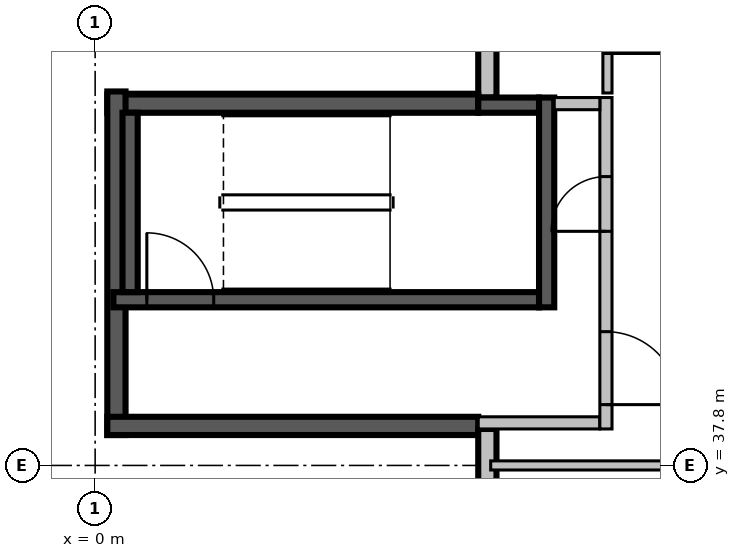
"""IFC4 building model, lengths in metres.
Left out: names, types, materials, properties, quantities, classifications, styles, units other than length and angle.
Written with IfcOpenShell. Run it as: python <this file> out.ifc"""

import sys

from ifc_helpers import new_model, si_unit, direction, frame, frame_2d, origin, place, context, subcontext, project, spatial, rectangle, extrude, source, transform, mapped, element, fill, save


model = new_model("IFC4")
c1 = context("Model", 3, precision=1e-05, world=origin(), true_north=direction((0.0, 1.0)))
c2 = subcontext(c1, "Body", "Model", "MODEL_VIEW")
j1 = project(units=[si_unit("LENGTHUNIT", "METRE"), si_unit("PLANEANGLEUNIT", "RADIAN")], contexts=[c1])
p1 = place(None, origin())
s1 = spatial("IfcSite", under=j1, at=p1, CompositionType="ELEMENT")
p2 = place(p1, origin())
s2 = spatial("IfcBuilding", under=s1, at=p2, CompositionType="ELEMENT")
p3 = place(p2, frame((0.0, 0.0, 141.3)))
s3 = spatial("IfcBuildingStorey", under=s2, at=p3, CompositionType="ELEMENT", Elevation=141.3)
m1 = source(origin(), c2, "Body", "SweptSolid", [
    extrude(rectangle(XDim=9.91, YDim=0.3, at=frame_2d((4.955, 0.0))), origin(), (0.0, 0.0, 1.0), 3.8),
])
p4 = place(p3, frame((6.45, 53.76, 0.0), z_axis=(0.0, 0.0, 1.0), x_axis=(0.0, -1.0, 0.0)))
e1 = element("IfcWall", 1, at=p4, inside=s3, PredefinedType="STANDARD", context=c2, shape_type="MappedRepresentation", body=[
    mapped(m1, transform((0.0, 0.0, 0.0), scale=1.0)),
])
m2 = source(origin(), c2, "Body", "SweptSolid", [
    extrude(rectangle(XDim=2.4, YDim=2.7, at=frame_2d((1.2, 1.35))), frame((0.0, 0.16, 0.0), z_axis=(0.0, -1.0, 0.0), x_axis=(1.0, 0.0, 0.0)), (0.0, 0.0, 1.0), 0.32),
])
p5 = place(p4, frame((4.272, 0.0, 0.6)))
e2 = element("IfcOpeningElement", 2, at=p5, cuts=e1, PredefinedType="OPENING", context=c2, shape_type="MappedRepresentation", body=[
    mapped(m2, transform((0.0, 0.0, 0.0), scale=1.0)),
])
p6 = place(p4, frame((0.936, 0.0, 0.6)))
e3 = element("IfcOpeningElement", 3, at=p6, cuts=e1, PredefinedType="OPENING", context=c2, shape_type="MappedRepresentation", body=[
    mapped(m2, transform((0.0, 0.0, 0.0), scale=1.0)),
])
m3 = source(origin(), c2, "Body", "SweptSolid", [
    extrude(rectangle(XDim=6.1, YDim=0.3, at=frame_2d((3.05, 0.0))), origin(), (0.0, 0.0, 1.0), 3.8),
])
p7 = place(p3, frame((6.3, 43.75, 0.0), z_axis=(0.0, 0.0, 1.0), x_axis=(-1.0, 0.0, 0.0)))
e4 = element("IfcWall", 4, at=p7, inside=s3, PredefinedType="SOLIDWALL", context=c2, shape_type="MappedRepresentation", body=[
    mapped(m3, transform((0.0, 0.0, 0.0), scale=1.0)),
])
m4 = source(origin(), c2, "Body", "SweptSolid", [
    extrude(rectangle(XDim=5.65, YDim=0.3, at=frame_2d((2.825, 0.0))), origin(), (0.0, 0.0, 1.0), 3.8),
])
p8 = place(p3, frame((0.35, 43.95, 0.0), z_axis=(0.0, 0.0, 1.0), x_axis=(0.0, -1.0, 0.0)))
e5 = element("IfcWall", 5, at=p8, inside=s3, PredefinedType="SOLIDWALL", context=c2, shape_type="MappedRepresentation", body=[
    mapped(m4, transform((0.0, 0.0, 0.0), scale=1.0)),
])
p9 = place(p3, frame((0.2, 38.45, 0.0), z_axis=(0.0, 0.0, 1.0), x_axis=(1.0, 0.0, 0.0)))
e6 = element("IfcWall", 6, at=p9, inside=s3, PredefinedType="SOLIDWALL", context=c2, shape_type="MappedRepresentation", body=[
    mapped(m3, transform((0.0, 0.0, 0.0), scale=1.0)),
])
m5 = source(origin(), c2, "Body", "SweptSolid", [
    extrude(rectangle(XDim=16.4, YDim=0.3, at=frame_2d((8.2, 0.0))), origin(), (0.0, 0.0, 1.0), 3.8),
])
p10 = place(p3, frame((6.45, 38.4, 0.0), z_axis=(0.0, 0.0, 1.0), x_axis=(0.0, -1.0, 0.0)))
e7 = element("IfcWall", 7, at=p10, inside=s3, PredefinedType="STANDARD", context=c2, shape_type="MappedRepresentation", body=[
    mapped(m5, transform((0.0, 0.0, 0.0), scale=1.0)),
])
m6 = source(origin(), c2, "Body", "SweptSolid", [
    extrude(rectangle(XDim=1.8, YDim=2.7, at=frame_2d((0.9, 1.35))), frame((0.0, 0.16, 0.0), z_axis=(0.0, -1.0, 0.0), x_axis=(1.0, 0.0, 0.0)), (0.0, 0.0, 1.0), 0.32),
])
p11 = place(p10, frame((1.15, 0.0, 0.6)))
e8 = element("IfcOpeningElement", 8, at=p11, cuts=e7, PredefinedType="OPENING", context=c2, shape_type="MappedRepresentation", body=[
    mapped(m6, transform((0.0, 0.0, 0.0), scale=1.0)),
])
p12 = place(p10, frame((9.438, 0.0, 0.6)))
e9 = element("IfcOpeningElement", 9, at=p12, cuts=e7, PredefinedType="OPENING", context=c2, shape_type="MappedRepresentation", body=[
    mapped(m6, transform((0.0, 0.0, 0.0), scale=1.0)),
])
m7 = source(origin(), c2, "Body", "SweptSolid", [
    extrude(rectangle(XDim=1.2, YDim=2.7, at=frame_2d((0.6, 1.35))), frame((0.0, 0.16, 0.0), z_axis=(0.0, -1.0, 0.0), x_axis=(1.0, 0.0, 0.0)), (0.0, 0.0, 1.0), 0.32),
])
p13 = place(p10, frame((12.912, 0.0, 0.6)))
e10 = element("IfcOpeningElement", 10, at=p13, cuts=e7, PredefinedType="OPENING", context=c2, shape_type="MappedRepresentation", body=[
    mapped(m7, transform((0.0, 0.0, 0.0), scale=1.0)),
])
m8 = source(origin(), c2, "Body", "SweptSolid", [
    extrude(rectangle(XDim=1.0, YDim=2.1, at=frame_2d((0.5, 1.05))), frame((0.0, 0.16, 0.0), z_axis=(0.0, -1.0, 0.0), x_axis=(1.0, 0.0, 0.0)), (0.0, 0.0, 1.0), 0.32),
])
p14 = place(p10, frame((5.908, 0.0, 0.0)))
e11 = element("IfcOpeningElement", 11, at=p14, cuts=e7, PredefinedType="OPENING", context=c2, shape_type="MappedRepresentation", body=[
    mapped(m8, transform((0.0, 0.0, 0.0), scale=1.0)),
])
m9 = source(origin(), c2, "Body", "SweptSolid", [
    extrude(rectangle(XDim=7.0, YDim=0.25, at=frame_2d((3.5, 0.0))), origin(), (0.0, 0.0, 1.0), 3.8),
])
p15 = place(p3, frame((0.3, 40.525, 0.0), z_axis=(0.0, 0.0, 1.0), x_axis=(1.0, 0.0, 0.0)))
e12 = element("IfcWall", 12, at=p15, inside=s3, PredefinedType="SOLIDWALL", context=c2, shape_type="MappedRepresentation", body=[
    mapped(m9, transform((0.0, 0.0, 0.0), scale=1.0)),
])
m10 = source(origin(), c2, "Body", "SweptSolid", [
    extrude(rectangle(XDim=1.1, YDim=2.1, at=frame_2d((0.55, 1.05))), frame((0.0, 0.135, 0.0), z_axis=(0.0, -1.0, 0.0), x_axis=(1.0, 0.0, 0.0)), (0.0, 0.0, 1.0), 0.27),
])
p16 = place(p15, frame((0.55, 0.0, 0.0)))
e13 = element("IfcOpeningElement", 13, at=p16, cuts=e12, PredefinedType="OPENING", context=c2, shape_type="MappedRepresentation", body=[
    mapped(m10, transform((0.0, 0.0, 0.0), scale=1.0)),
])
m11 = source(origin(), c2, "Body", "SweptSolid", [
    extrude(rectangle(XDim=1.0, YDim=0.25, at=frame_2d((0.5, 0.0))), origin(), (0.0, 0.0, 1.0), 3.8),
])
p17 = place(p3, frame((6.3, 43.725, 0.0), z_axis=(0.0, 0.0, 1.0), x_axis=(1.0, 0.0, 0.0)))
e14 = element("IfcWall", 14, at=p17, inside=s3, PredefinedType="SOLIDWALL", context=c2, shape_type="MappedRepresentation", body=[
    mapped(m11, transform((0.0, 0.0, 0.0), scale=1.0)),
])
m12 = source(origin(), c2, "Body", "SweptSolid", [
    extrude(rectangle(XDim=3.45, YDim=0.25, at=frame_2d((1.725, 0.0))), origin(), (0.0, 0.0, 1.0), 3.8),
])
p18 = place(p3, frame((7.425, 40.4, 0.0), z_axis=(0.0, 0.0, 1.0), x_axis=(0.0, 1.0, 0.0)))
e15 = element("IfcWall", 15, at=p18, inside=s3, PredefinedType="SOLIDWALL", context=c2, shape_type="MappedRepresentation", body=[
    mapped(m12, transform((0.0, 0.0, 0.0), scale=1.0)),
])
m13 = source(origin(), c2, "Body", "SweptSolid", [
    extrude(rectangle(XDim=2.95, YDim=0.25, at=frame_2d((1.475, 0.0))), origin(), (0.0, 0.0, 1.0), 3.8),
])
p19 = place(p3, frame((0.575, 40.65, 0.0), z_axis=(0.0, 0.0, 1.0), x_axis=(0.0, 1.0, 0.0)))
e16 = element("IfcWall", 16, at=p19, inside=s3, PredefinedType="SOLIDWALL", context=c2, shape_type="MappedRepresentation", body=[
    mapped(m13, transform((0.0, 0.0, 0.0), scale=1.0)),
])
m14 = source(origin(), c2, "Body", "SweptSolid", [
    extrude(rectangle(XDim=2.0, YDim=0.2, at=frame_2d((1.0, 0.0))), origin(), (0.0, 0.0, 1.0), 3.8),
])
p20 = place(p3, frame((6.3, 38.5, 0.0), z_axis=(0.0, 0.0, 1.0), x_axis=(1.0, 0.0, 0.0)))
e17 = element("IfcWall", 17, at=p20, inside=s3, PredefinedType="PARTITIONING", context=c2, shape_type="MappedRepresentation", body=[
    mapped(m14, transform((0.0, 0.0, 0.0), scale=1.0)),
])
m15 = source(origin(), c2, "Body", "SweptSolid", [
    extrude(rectangle(XDim=5.45, YDim=0.2, at=frame_2d((2.725, 0.0))), origin(), (0.0, 0.0, 1.0), 3.8),
])
p21 = place(p3, frame((8.4, 38.4, 0.0), z_axis=(0.0, 0.0, 1.0), x_axis=(0.0, 1.0, 0.0)))
e18 = element("IfcWall", 18, at=p21, inside=s3, PredefinedType="PARTITIONING", context=c2, shape_type="MappedRepresentation", body=[
    mapped(m15, transform((0.0, 0.0, 0.0), scale=1.0)),
])
m16 = source(origin(), c2, "Body", "SweptSolid", [
    extrude(rectangle(XDim=1.2, YDim=2.1, at=frame_2d((0.6, 1.05))), frame((0.0, 0.11, 0.0), z_axis=(0.0, -1.0, 0.0), x_axis=(1.0, 0.0, 0.0)), (0.0, 0.0, 1.0), 0.22),
])
p22 = place(p21, frame((0.4, 0.0, 0.0)))
e19 = element("IfcOpeningElement", 19, at=p22, cuts=e18, PredefinedType="OPENING", context=c2, shape_type="MappedRepresentation", body=[
    mapped(m16, transform((0.0, 0.0, 0.0), scale=1.0)),
])
m17 = source(origin(), c2, "Body", "SweptSolid", [
    extrude(rectangle(XDim=0.9, YDim=2.1, at=frame_2d((0.45, 1.05))), frame((0.0, 0.11, 0.0), z_axis=(0.0, -1.0, 0.0), x_axis=(1.0, 0.0, 0.0)), (0.0, 0.0, 1.0), 0.22),
])
p23 = place(p21, frame((3.25, 0.0, 0.0)))
e20 = element("IfcOpeningElement", 20, at=p23, cuts=e18, PredefinedType="OPENING", context=c2, shape_type="MappedRepresentation", body=[
    mapped(m17, transform((0.0, 0.0, 0.0), scale=1.0)),
])
m18 = source(origin(), c2, "Body", "SweptSolid", [
    extrude(rectangle(XDim=0.75, YDim=0.2, at=frame_2d((0.375, 0.0))), origin(), (0.0, 0.0, 1.0), 3.8),
])
p24 = place(p3, frame((7.55, 43.75, 0.0), z_axis=(0.0, 0.0, 1.0), x_axis=(1.0, 0.0, 0.0)))
e21 = element("IfcWall", 21, at=p24, inside=s3, PredefinedType="PARTITIONING", context=c2, shape_type="MappedRepresentation", body=[
    mapped(m18, transform((0.0, 0.0, 0.0), scale=1.0)),
])
m19 = source(origin(), c2, "Body", "SweptSolid", [
    extrude(rectangle(XDim=2.2, YDim=0.15, at=frame_2d((1.1, 0.0))), origin(), (0.0, 0.0, 1.0), 3.8),
])
p25 = place(p3, frame((8.425, 43.925, 0.0), z_axis=(0.0, 0.0, 1.0), x_axis=(0.0, 1.0, 0.0)))
e22 = element("IfcWall", 22, at=p25, inside=s3, PredefinedType="PARTITIONING", context=c2, shape_type="MappedRepresentation", body=[
    mapped(m19, transform((0.0, 0.0, 0.0), scale=1.0)),
])
m20 = source(origin(), c2, "Body", "SweptSolid", [
    extrude(rectangle(XDim=0.9, YDim=2.1, at=frame_2d((0.45, 1.05))), frame((0.0, 0.085, 0.0), z_axis=(0.0, -1.0, 0.0), x_axis=(1.0, 0.0, 0.0)), (0.0, 0.0, 1.0), 0.17),
])
p26 = place(p25, frame((0.65, 0.0, 0.0)))
e23 = element("IfcOpeningElement", 23, at=p26, cuts=e22, PredefinedType="OPENING", context=c2, shape_type="MappedRepresentation", body=[
    mapped(m20, transform((0.0, 0.0, 0.0), scale=1.0)),
])
m21 = source(origin(), c2, "Body", "SweptSolid", [
    extrude(rectangle(XDim=3.471, YDim=0.15, at=frame_2d((1.736, 0.0))), origin(), (0.0, 0.0, 1.0), 3.8),
])
p27 = place(p3, frame((9.976, 37.8, 0.0), z_axis=(0.0, 0.0, 1.0), x_axis=(-1.0, 0.0, 0.0)))
e24 = element("IfcWall", 24, at=p27, inside=s3, PredefinedType="PARTITIONING", context=c2, shape_type="MappedRepresentation", body=[
    mapped(m21, transform((0.0, 0.0, 0.0), scale=1.0)),
])
m22 = source(origin(), c2, "Body", "SweptSolid", [
    extrude(rectangle(XDim=1.1, YDim=2.1, at=frame_2d((0.55, 1.05))), frame((0.0, 0.025, 0.0), z_axis=(0.0, -1.0, 0.0), x_axis=(1.0, 0.0, 0.0)), (0.0, 0.0, 1.0), 0.05),
])
p28 = place(p16, origin())
e25 = element("IfcDoor", 25, at=p28, inside=s3, OperationType="SINGLE_SWING_LEFT", PredefinedType="DOOR", context=c2, shape_type="MappedRepresentation", body=[
    mapped(m22, transform((0.0, 0.0, 0.0), scale=1.0)),
])
fill(e13, e25)
m23 = source(origin(), c2, "Body", "SweptSolid", [
    extrude(rectangle(XDim=1.2, YDim=2.1, at=frame_2d((0.6, 1.05))), frame((0.0, 0.025, 0.0), z_axis=(0.0, -1.0, 0.0), x_axis=(1.0, 0.0, 0.0)), (0.0, 0.0, 1.0), 0.05),
])
p29 = place(p22, origin())
e26 = element("IfcDoor", 26, at=p29, inside=s3, OperationType="SINGLE_SWING_RIGHT", PredefinedType="DOOR", context=c2, shape_type="MappedRepresentation", body=[
    mapped(m23, transform((0.0, 0.0, 0.0), scale=1.0)),
])
fill(e19, e26)
m24 = source(origin(), c2, "Body", "SweptSolid", [
    extrude(rectangle(XDim=0.9, YDim=2.1, at=frame_2d((0.45, 1.05))), frame((0.0, 0.025, 0.0), z_axis=(0.0, -1.0, 0.0), x_axis=(1.0, 0.0, 0.0)), (0.0, 0.0, 1.0), 0.05),
])
p30 = place(p23, origin())
e27 = element("IfcDoor", 27, at=p30, inside=s3, OperationType="SINGLE_SWING_LEFT", PredefinedType="DOOR", context=c2, shape_type="MappedRepresentation", body=[
    mapped(m24, transform((0.0, 0.0, 0.0), scale=1.0)),
])
fill(e20, e27)
p31 = place(p26, origin())
e28 = element("IfcDoor", 28, at=p31, inside=s3, OperationType="SINGLE_SWING_RIGHT", PredefinedType="DOOR", context=c2, shape_type="MappedRepresentation", body=[
    mapped(m24, transform((0.0, 0.0, 0.0), scale=1.0)),
])
fill(e23, e28)
save(model, sys.argv[1])
